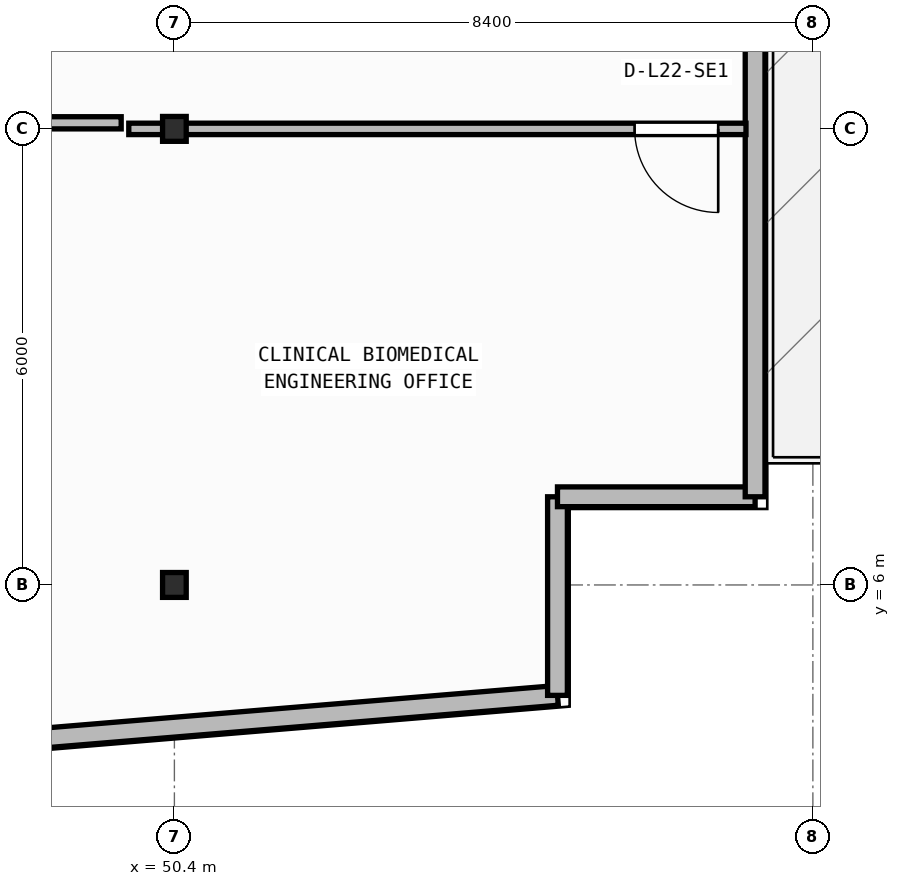
"""IFC4 building model, lengths in metres.
Left out: names, types, materials, properties, quantities, classifications, styles, units other than length and angle.
Written with IfcOpenShell. Run it as: python <this file> out.ifc"""

import sys

from ifc_helpers import new_model, si_unit, direction, frame, frame_2d, origin, origin_2d, place, context, subcontext, project, spatial, rectangle, i_section, extrude, element, fill, save


model = new_model("IFC4")
c1 = context("Model", 3, precision=1e-05, world=origin(), true_north=direction((0.0, 1.0)))
c2 = subcontext(c1, "Body", "Model", "MODEL_VIEW")
j1 = project(units=[si_unit("LENGTHUNIT", "METRE"), si_unit("PLANEANGLEUNIT", "RADIAN")], contexts=[c1])
p1 = place(None, origin())
s1 = spatial("IfcSite", under=j1, at=p1, CompositionType="ELEMENT")
p2 = place(p1, origin())
s2 = spatial("IfcBuilding", under=s1, at=p2, CompositionType="ELEMENT")
p3 = place(p2, frame((0.0, 0.0, 89.65)))
s3 = spatial("IfcBuildingStorey", under=s2, at=p3, CompositionType="ELEMENT", Elevation=89.65)
for number, where, z_axis, x_axis in (
    (1, (50.4, 6.0, 0.0), (0.0, 0.0, 1.0), (1.0, 0.0, 0.0)),
    (2, (50.4, 12.0, 0.0), (0.0, 0.0, 1.0), (1.0, 0.0, 0.0)),
):
    element("IfcColumn", number, at=place(p3, frame(where, z_axis=z_axis, x_axis=x_axis)), inside=s3, PredefinedType="COLUMN", context=c2, shape_type="SweptSolid", body=[
        extrude(i_section(OverallWidth=0.311, OverallDepth=0.327, WebThickness=0.016, FlangeThickness=0.025, FilletRadius=0.017, at=origin_2d()), origin(), (0.0, 0.0, 1.0), 3.95),
    ])
p4 = place(p3, frame((2.76, 0.174, 0.0), z_axis=(0.0, 0.0, 1.0), x_axis=(0.996571478456, 0.082736257641, 0.0)))
e3 = element("IfcWall", 3, at=p4, inside=s3, PredefinedType="STANDARD", context=c2, shape_type="SweptSolid", body=[
    extrude(rectangle(XDim=52.861, YDim=0.26, at=frame_2d((26.431, 0.0))), origin(), (0.0, 0.0, 1.0), 3.71),
])
p5 = place(p4, frame((25.231, 0.0, 0.9)))
e4 = element("IfcOpeningElement", 4, at=p5, cuts=e3, PredefinedType="OPENING", context=c2, shape_type="SweptSolid", body=[
    extrude(rectangle(XDim=2.4, YDim=1.65, at=frame_2d((1.2, 0.825))), frame((0.0, 0.14, 0.0), z_axis=(0.0, -1.0, 0.0), x_axis=(1.0, 0.0, 0.0)), (0.0, 0.0, 1.0), 0.28),
])
p6 = place(p3, frame((55.44, 4.547, 0.0), z_axis=(0.0, 0.0, 1.0), x_axis=(0.0, 1.0, 0.0)))
e5 = element("IfcWall", 5, at=p6, inside=s3, PredefinedType="STANDARD", context=c2, shape_type="SweptSolid", body=[
    extrude(rectangle(XDim=2.613, YDim=0.26, at=frame_2d((1.306, 0.0))), origin(), (0.0, 0.0, 1.0), 3.71),
])
p7 = place(p3, frame((55.44, 7.16, 0.0), z_axis=(0.0, 0.0, 1.0), x_axis=(1.0, 0.0, 0.0)))
e6 = element("IfcWall", 6, at=p7, inside=s3, PredefinedType="STANDARD", context=c2, shape_type="SweptSolid", body=[
    extrude(rectangle(XDim=2.6, YDim=0.26, at=frame_2d((1.3, 0.0))), origin(), (0.0, 0.0, 1.0), 3.71),
])
p8 = place(p3, frame((58.04, 7.16, 0.0), z_axis=(0.0, 0.0, 1.0), x_axis=(0.0, 1.0, 0.0)))
e7 = element("IfcWall", 7, at=p8, inside=s3, PredefinedType="STANDARD", context=c2, shape_type="SweptSolid", body=[
    extrude(rectangle(XDim=24.48, YDim=0.26, at=frame_2d((12.24, 0.0))), origin(), (0.0, 0.0, 1.0), 3.71),
])
p9 = place(p8, frame((8.87, 0.0, 0.0)))
e8 = element("IfcOpeningElement", 8, at=p9, cuts=e7, PredefinedType="OPENING", context=c2, shape_type="SweptSolid", body=[
    extrude(rectangle(XDim=1.3, YDim=2.15, at=frame_2d((0.65, 1.075))), frame((0.0, 0.14, 0.0), z_axis=(0.0, -1.0, 0.0), x_axis=(1.0, 0.0, 0.0)), (0.0, 0.0, 1.0), 0.28),
])
p10 = place(p3, frame((57.92, 12.0, 0.0), z_axis=(0.0, 0.0, 1.0), x_axis=(-1.0, 0.0, 0.0)))
e9 = element("IfcWall", 9, at=p10, inside=s3, PredefinedType="PARTITIONING", context=c2, shape_type="SweptSolid", body=[
    extrude(rectangle(XDim=8.12, YDim=0.15, at=frame_2d((4.06, 0.0))), origin(), (0.0, 0.0, 1.0), 3.073),
])
p11 = place(p10, frame((0.365, 0.0, 0.0)))
e10 = element("IfcOpeningElement", 10, at=p11, cuts=e9, PredefinedType="OPENING", context=c2, shape_type="SweptSolid", body=[
    extrude(rectangle(XDim=1.1, YDim=2.1, at=frame_2d((0.55, 1.05))), frame((0.0, 0.085, 0.0), z_axis=(0.0, -1.0, 0.0), x_axis=(1.0, 0.0, 0.0)), (0.0, 0.0, 1.0), 0.17),
])
p12 = place(p3, frame((46.689, 12.08, 0.0), z_axis=(0.0, 0.0, 1.0), x_axis=(1.0, 0.0, 0.0)))
e11 = element("IfcWall", 11, at=p12, inside=s3, PredefinedType="PARTITIONING", context=c2, shape_type="SweptSolid", body=[
    extrude(rectangle(XDim=3.011, YDim=0.16, at=frame_2d((1.505, 0.0))), origin(), (0.0, 0.0, 1.0), 3.073),
])
p13 = place(p11, origin())
e12 = element("IfcDoor", 12, at=p13, inside=s3, OperationType="SINGLE_SWING_LEFT", PredefinedType="DOOR", context=c2, shape_type="SweptSolid", body=[
    extrude(rectangle(XDim=1.1, YDim=2.1, at=frame_2d((0.55, 1.05))), frame((0.0, 0.025, 0.0), z_axis=(0.0, -1.0, 0.0), x_axis=(1.0, 0.0, 0.0)), (0.0, 0.0, 1.0), 0.05),
])
fill(e10, e12)
save(model, sys.argv[1])
